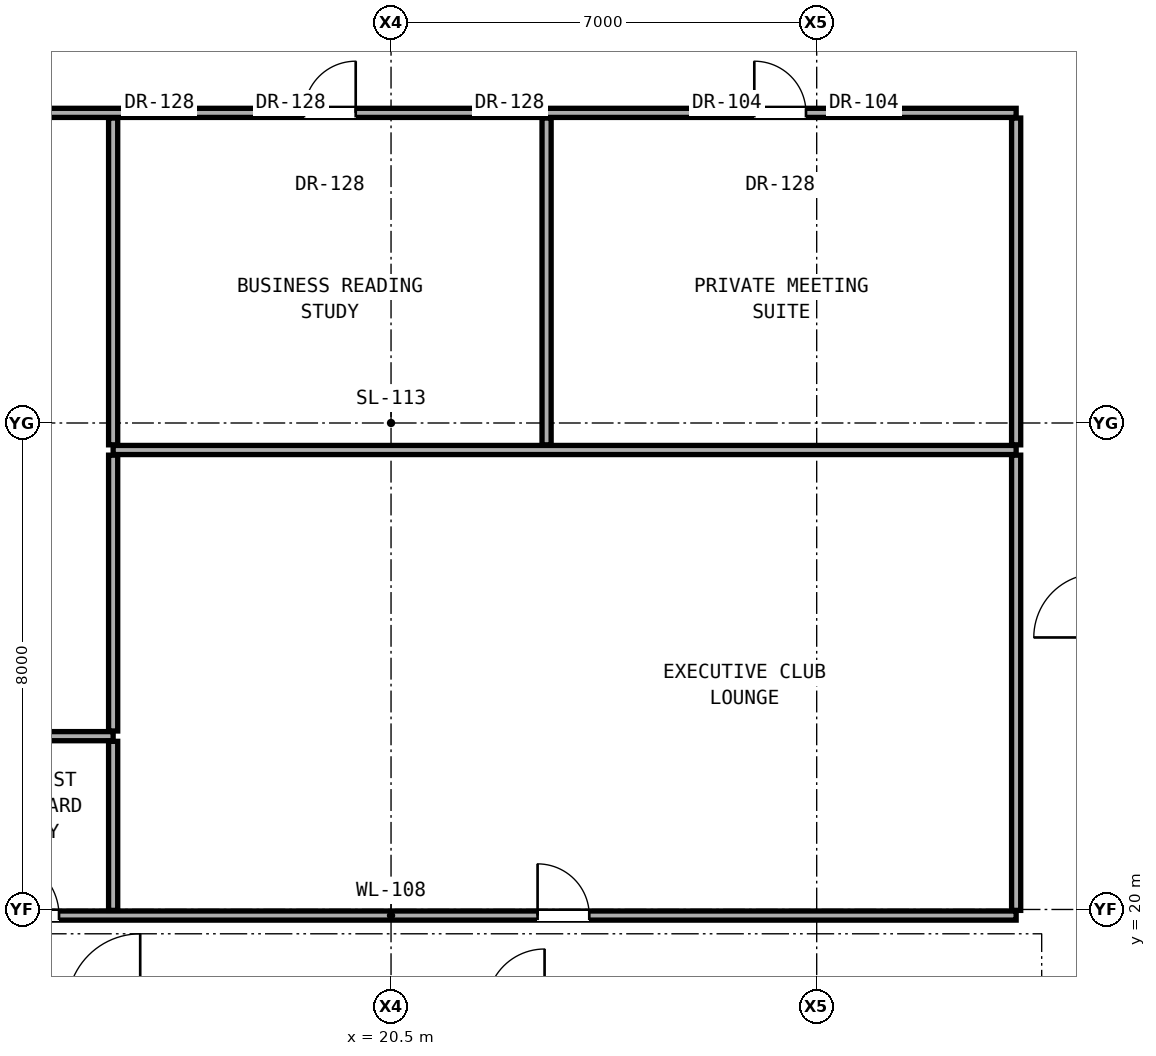
"""IFC4 building model, lengths in metres.
Left out: names, types, materials, properties, quantities, classifications, styles, units other than length and angle.
Written with IfcOpenShell. Run it as: python <this file> out.ifc"""

import sys

from ifc_helpers import new_model, si_unit, direction, frame, frame_2d, origin, place, context, subcontext, project, spatial, rectangle, extrude, element, fill, save


model = new_model("IFC4")
c1 = context("Model", 3, precision=1e-05, world=origin(), true_north=direction((0.0, 1.0)))
c2 = subcontext(c1, "Body", "Model", "MODEL_VIEW")
j1 = project(units=[si_unit("LENGTHUNIT", "METRE"), si_unit("PLANEANGLEUNIT", "RADIAN")], contexts=[c1])
p1 = place(None, origin())
s1 = spatial("IfcSite", under=j1, at=p1, CompositionType="ELEMENT")
p2 = place(p1, origin())
s2 = spatial("IfcBuilding", under=s1, at=p2, CompositionType="ELEMENT")
p3 = place(p2, frame((0.0, 0.0, 190.15)))
s3 = spatial("IfcBuildingStorey", under=s2, at=p3, CompositionType="ELEMENT", Elevation=190.15)
p4 = place(p3, frame((10.22, 19.9, 0.0), z_axis=(0.0, 0.0, 1.0), x_axis=(1.0, 0.0, 0.0)))
e1 = element("IfcWall", 1, at=p4, inside=s3, PredefinedType="PARTITIONING", context=c2, shape_type="SweptSolid", body=[
    extrude(rectangle(XDim=20.56, YDim=0.15, at=frame_2d((10.28, 0.0))), origin(), (0.0, 0.0, 1.0), 2.186),
])
p5 = place(p4, frame((1.36, 0.0, 0.0)))
e2 = element("IfcOpeningElement", 2, at=p5, cuts=e1, PredefinedType="OPENING", context=c2, shape_type="SweptSolid", body=[
    extrude(rectangle(XDim=0.9, YDim=2.1, at=frame_2d((0.45, 1.05))), frame((0.0, 0.085, 0.0), z_axis=(0.0, -1.0, 0.0), x_axis=(1.0, 0.0, 0.0)), (0.0, 0.0, 1.0), 0.17),
])
p6 = place(p4, frame((3.87, 0.0, 0.0)))
e3 = element("IfcOpeningElement", 3, at=p6, cuts=e1, PredefinedType="OPENING", context=c2, shape_type="SweptSolid", body=[
    extrude(rectangle(XDim=0.95, YDim=2.15, at=frame_2d((0.475, 1.075))), frame((0.0, 0.085, 0.0), z_axis=(0.0, -1.0, 0.0), x_axis=(1.0, 0.0, 0.0)), (0.0, 0.0, 1.0), 0.17),
])
p7 = place(p4, frame((12.69, 0.0, 0.0)))
e4 = element("IfcOpeningElement", 4, at=p7, cuts=e1, PredefinedType="OPENING", context=c2, shape_type="SweptSolid", body=[
    extrude(rectangle(XDim=0.85, YDim=2.01, at=frame_2d((0.425, 1.005))), frame((0.0, 0.085, 0.0), z_axis=(0.0, -1.0, 0.0), x_axis=(1.0, 0.0, 0.0)), (0.0, 0.0, 1.0), 0.17),
])
p8 = place(p3, frame((10.22, 22.85, 0.0), z_axis=(0.0, 0.0, 1.0), x_axis=(1.0, 0.0, 0.0)))
e5 = element("IfcWall", 5, at=p8, inside=s3, PredefinedType="PARTITIONING", context=c2, shape_type="SweptSolid", body=[
    extrude(rectangle(XDim=5.71, YDim=0.15, at=frame_2d((2.855, 0.0))), origin(), (0.0, 0.0, 1.0), 2.186),
])
p9 = place(p3, frame((15.93, 27.556, 0.0), z_axis=(0.0, 0.0, 1.0), x_axis=(1.0, 0.0, 0.0)))
e6 = element("IfcWall", 6, at=p9, inside=s3, PredefinedType="PARTITIONING", context=c2, shape_type="SweptSolid", body=[
    extrude(rectangle(XDim=14.85, YDim=0.15, at=frame_2d((7.425, 0.0))), origin(), (0.0, 0.0, 1.0), 2.186),
])
p10 = place(p3, frame((10.22, 33.1, 0.0), z_axis=(0.0, 0.0, 1.0), x_axis=(1.0, 0.0, 0.0)))
e7 = element("IfcWall", 7, at=p10, inside=s3, PredefinedType="PARTITIONING", context=c2, shape_type="SweptSolid", body=[
    extrude(rectangle(XDim=20.56, YDim=0.15, at=frame_2d((10.28, 0.0))), origin(), (0.0, 0.0, 1.0), 2.186),
])
p11 = place(p10, frame((8.849, 0.0, 0.0)))
e8 = element("IfcOpeningElement", 8, at=p11, cuts=e7, PredefinedType="OPENING", context=c2, shape_type="SweptSolid", body=[
    extrude(rectangle(XDim=0.85, YDim=2.01, at=frame_2d((0.425, 1.005))), frame((0.0, 0.085, 0.0), z_axis=(0.0, -1.0, 0.0), x_axis=(1.0, 0.0, 0.0)), (0.0, 0.0, 1.0), 0.17),
])
p12 = place(p10, frame((16.254, 0.0, 0.0)))
e9 = element("IfcOpeningElement", 9, at=p12, cuts=e7, PredefinedType="OPENING", context=c2, shape_type="SweptSolid", body=[
    extrude(rectangle(XDim=0.85, YDim=2.01, at=frame_2d((0.425, 1.005))), frame((0.0, 0.085, 0.0), z_axis=(0.0, -1.0, 0.0), x_axis=(1.0, 0.0, 0.0)), (0.0, 0.0, 1.0), 0.17),
])
p13 = place(p3, frame((15.93, 19.985, 0.0), z_axis=(0.0, 0.0, 1.0), x_axis=(0.0, 1.0, 0.0)))
e10 = element("IfcWall", 10, at=p13, inside=s3, PredefinedType="PARTITIONING", context=c2, shape_type="SweptSolid", body=[
    extrude(rectangle(XDim=2.78, YDim=0.15, at=frame_2d((1.39, 0.0))), origin(), (0.0, 0.0, 1.0), 3.05),
])
p14 = place(p3, frame((15.93, 22.935, 0.0), z_axis=(0.0, 0.0, 1.0), x_axis=(0.0, 1.0, 0.0)))
e11 = element("IfcWall", 11, at=p14, inside=s3, PredefinedType="PARTITIONING", context=c2, shape_type="SweptSolid", body=[
    extrude(rectangle(XDim=4.536, YDim=0.15, at=frame_2d((2.268, 0.0))), origin(), (0.0, 0.0, 1.0), 2.186),
])
for number, where, z_axis, x_axis in (
    (12, (15.93, 27.641, 0.0), (0.0, 0.0, 1.0), (0.0, 1.0, 0.0)),
    (13, (23.058, 27.641, 0.0), (0.0, 0.0, 1.0), (0.0, 1.0, 0.0)),
):
    element("IfcWall", number, at=place(p3, frame(where, z_axis=z_axis, x_axis=x_axis)), inside=s3, PredefinedType="PARTITIONING", context=c2, shape_type="SweptSolid", body=[
        extrude(rectangle(XDim=5.374, YDim=0.15, at=frame_2d((2.687, 0.0))), origin(), (0.0, 0.0, 1.0), 2.186),
    ])
p15 = place(p3, frame((30.78, 19.985, 0.0), z_axis=(0.0, 0.0, 1.0), x_axis=(0.0, 1.0, 0.0)))
e14 = element("IfcWall", 14, at=p15, inside=s3, PredefinedType="PARTITIONING", context=c2, shape_type="SweptSolid", body=[
    extrude(rectangle(XDim=7.486, YDim=0.15, at=frame_2d((3.743, 0.0))), origin(), (0.0, 0.0, 1.0), 2.346),
])
p16 = place(p3, frame((30.78, 27.641, 0.0), z_axis=(0.0, 0.0, 1.0), x_axis=(0.0, 1.0, 0.0)))
e15 = element("IfcWall", 15, at=p16, inside=s3, PredefinedType="PARTITIONING", context=c2, shape_type="SweptSolid", body=[
    extrude(rectangle(XDim=5.374, YDim=0.15, at=frame_2d((2.687, 0.0))), origin(), (0.0, 0.0, 1.0), 2.346),
])
p17 = place(p6, origin())
e16 = element("IfcDoor", 16, at=p17, inside=s3, OperationType="SINGLE_SWING_LEFT", PredefinedType="DOOR", context=c2, shape_type="SweptSolid", body=[
    extrude(rectangle(XDim=0.95, YDim=2.15, at=frame_2d((0.475, 1.075))), frame((0.0, 0.025, 0.0), z_axis=(0.0, -1.0, 0.0), x_axis=(1.0, 0.0, 0.0)), (0.0, 0.0, 1.0), 0.05),
])
fill(e3, e16)
p18 = place(p7, origin())
e17 = element("IfcDoor", 17, at=p18, inside=s3, OperationType="SINGLE_SWING_LEFT", PredefinedType="DOOR", context=c2, shape_type="SweptSolid", body=[
    extrude(rectangle(XDim=0.85, YDim=2.01, at=frame_2d((0.425, 1.005))), frame((0.0, 0.025, 0.0), z_axis=(0.0, -1.0, 0.0), x_axis=(1.0, 0.0, 0.0)), (0.0, 0.0, 1.0), 0.05),
])
fill(e4, e17)
p19 = place(p11, origin())
e18 = element("IfcDoor", 18, at=p19, inside=s3, OperationType="SINGLE_SWING_RIGHT", PredefinedType="DOOR", context=c2, shape_type="SweptSolid", body=[
    extrude(rectangle(XDim=0.85, YDim=2.01, at=frame_2d((0.425, 1.005))), frame((0.0, 0.025, 0.0), z_axis=(0.0, -1.0, 0.0), x_axis=(1.0, 0.0, 0.0)), (0.0, 0.0, 1.0), 0.05),
])
fill(e8, e18)
p20 = place(p12, origin())
e19 = element("IfcDoor", 19, at=p20, inside=s3, OperationType="SINGLE_SWING_LEFT", PredefinedType="DOOR", context=c2, shape_type="SweptSolid", body=[
    extrude(rectangle(XDim=0.85, YDim=2.01, at=frame_2d((0.425, 1.005))), frame((0.0, 0.025, 0.0), z_axis=(0.0, -1.0, 0.0), x_axis=(1.0, 0.0, 0.0)), (0.0, 0.0, 1.0), 0.05),
])
fill(e9, e19)
save(model, sys.argv[1])
